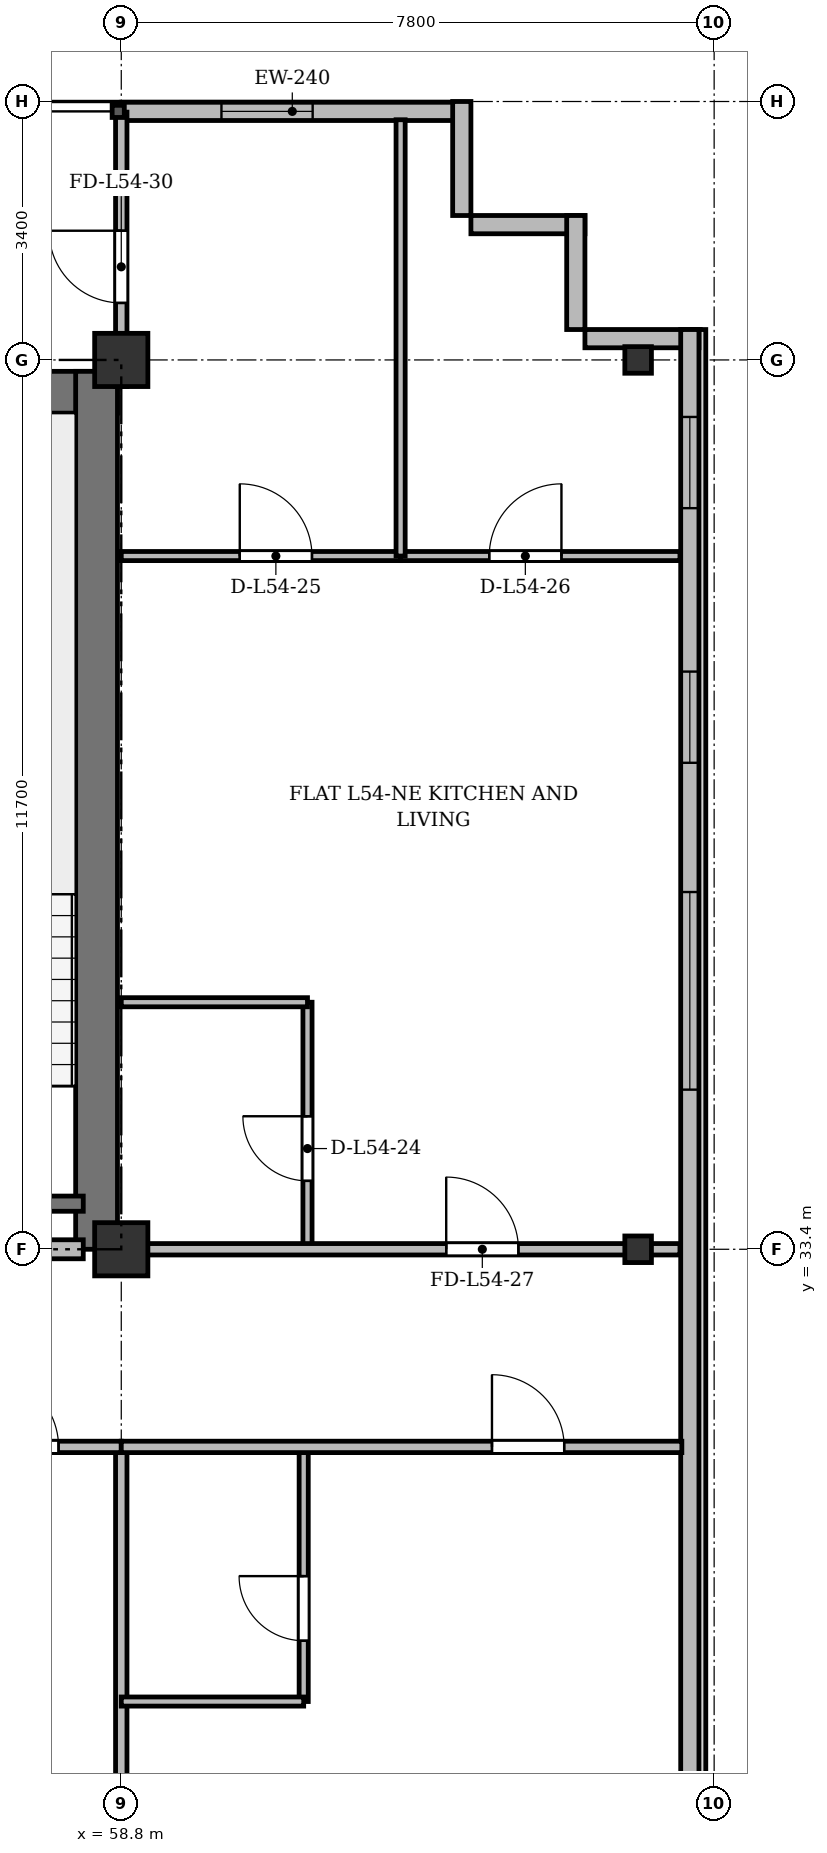
"""IFC4 building model, lengths in metres.
Left out: names, types, materials, properties, quantities, classifications, styles, units other than length and angle.
Written with IfcOpenShell. Run it as: python <this file> out.ifc"""

import sys

from ifc_helpers import new_model, si_unit, direction, frame, frame_2d, origin, origin_2d, place, context, subcontext, project, spatial, rectangle, i_section, extrude, source, transform, mapped, element, fill, save


model = new_model("IFC4")
c1 = context("Model", 3, precision=1e-05, world=origin(), true_north=direction((0.0, 1.0)))
c2 = subcontext(c1, "Body", "Model", "MODEL_VIEW")
j1 = project(units=[si_unit("LENGTHUNIT", "METRE"), si_unit("PLANEANGLEUNIT", "RADIAN")], contexts=[c1])
p1 = place(None, origin())
s1 = spatial("IfcSite", under=j1, at=p1, CompositionType="ELEMENT")
p2 = place(p1, origin())
s2 = spatial("IfcBuilding", under=s1, at=p2, CompositionType="ELEMENT")
p3 = place(p2, frame((0.0, 0.0, 208.5)))
s3 = spatial("IfcBuildingStorey", under=s2, at=p3, CompositionType="ELEMENT", Elevation=208.5)
m1 = source(origin(), c2, "Body", "SweptSolid", [
    extrude(rectangle(XDim=0.7, YDim=0.7, at=origin_2d()), origin(), (0.0, 0.0, 1.0), 3.6),
])
for number, where, z_axis, x_axis in (
    (1, (58.8, 33.4, 0.0), (0.0, 0.0, 1.0), (1.0, 0.0, 0.0)),
    (2, (58.8, 45.1, 0.0), (0.0, 0.0, 1.0), (1.0, 0.0, 0.0)),
):
    element("IfcColumn", number, at=place(p3, frame(where, z_axis=z_axis, x_axis=x_axis)), inside=s3, PredefinedType="COLUMN", context=c2, shape_type="MappedRepresentation", body=[
        mapped(m1, transform((0.0, 0.0, 0.0), x_axis=(1.0, 0.0, 0.0), y_axis=(0.0, 1.0, 0.0), z_axis=(0.0, 0.0, 1.0), scale=1.0)),
    ])
m2 = source(origin(), c2, "Body", "SweptSolid", [
    extrude(i_section(OverallWidth=0.35, OverallDepth=0.35, WebThickness=0.018, FlangeThickness=0.028, at=origin_2d()), origin(), (0.0, 0.0, 1.0), 3.6),
])
for number, where, z_axis, x_axis in (
    (3, (65.6, 33.4, 0.0), (0.0, 0.0, 1.0), (1.0, 0.0, 0.0)),
    (4, (65.6, 45.1, 0.0), (0.0, 0.0, 1.0), (1.0, 0.0, 0.0)),
):
    element("IfcColumn", number, at=place(p3, frame(where, z_axis=z_axis, x_axis=x_axis)), inside=s3, PredefinedType="COLUMN", context=c2, shape_type="MappedRepresentation", body=[
        mapped(m2, transform((0.0, 0.0, 0.0), x_axis=(1.0, 0.0, 0.0), y_axis=(0.0, 1.0, 0.0), z_axis=(0.0, 0.0, 1.0), scale=1.0)),
    ])
p4 = place(p3, frame((58.8, 48.37, 0.0), z_axis=(0.0, 0.0, 1.0), x_axis=(1.0, 0.0, 0.0)))
e5 = element("IfcWall", 5, at=p4, inside=s3, PredefinedType="SOLIDWALL", context=c2, shape_type="SweptSolid", body=[
    extrude(rectangle(XDim=4.5, YDim=0.24, at=frame_2d((2.25, 0.0))), origin(), (0.0, 0.0, 1.0), 3.36),
])
p5 = place(p4, frame((1.318, 0.0, 0.9)))
e6 = element("IfcOpeningElement", 6, at=p5, cuts=e5, PredefinedType="OPENING", context=c2, shape_type="SweptSolid", body=[
    extrude(rectangle(XDim=1.2, YDim=1.65, at=frame_2d((0.6, 0.825))), frame((0.0, 0.13, 0.0), z_axis=(0.0, -1.0, 0.0), x_axis=(1.0, 0.0, 0.0)), (0.0, 0.0, 1.0), 0.26),
])
for number, where, z_axis, x_axis in (
    (7, (63.28, 48.5, 0.0), (0.0, 0.0, 1.0), (0.0, -1.0, 0.0)),
    (8, (63.4, 46.88, 0.0), (0.0, 0.0, 1.0), (1.0, 0.0, 0.0)),
    (9, (64.78, 47.0, 0.0), (0.0, 0.0, 1.0), (0.0, -1.0, 0.0)),
    (10, (64.9, 45.38, 0.0), (0.0, 0.0, 1.0), (1.0, 0.0, 0.0)),
):
    element("IfcWall", number, at=place(p3, frame(where, z_axis=z_axis, x_axis=x_axis)), inside=s3, PredefinedType="SOLIDWALL", context=c2, shape_type="SweptSolid", body=[
        extrude(rectangle(XDim=1.5, YDim=0.24, at=frame_2d((0.75, 0.0))), origin(), (0.0, 0.0, 1.0), 3.36),
    ])
p6 = place(p3, frame((66.28, 45.5, 0.0), z_axis=(0.0, 0.0, 1.0), x_axis=(0.0, -1.0, 0.0)))
e11 = element("IfcWall", 11, at=p6, inside=s3, PredefinedType="SOLIDWALL", context=c2, shape_type="SweptSolid", body=[
    extrude(rectangle(XDim=39.1, YDim=0.24, at=frame_2d((19.55, 0.0))), origin(), (0.0, 0.0, 1.0), 3.36),
])
p7 = place(p6, frame((36.45, 0.0, 0.92)))
e12 = element("IfcOpeningElement", 12, at=p7, cuts=e11, PredefinedType="OPENING", context=c2, shape_type="SweptSolid", body=[
    extrude(rectangle(XDim=1.2, YDim=1.65, at=frame_2d((0.6, 0.825))), frame((0.0, 0.13, 0.0), z_axis=(0.0, -1.0, 0.0), x_axis=(1.0, 0.0, 0.0)), (0.0, 0.0, 1.0), 0.26),
])
p8 = place(p6, frame((32.8, 0.0, 0.92)))
e13 = element("IfcOpeningElement", 13, at=p8, cuts=e11, PredefinedType="OPENING", context=c2, shape_type="SweptSolid", body=[
    extrude(rectangle(XDim=2.6, YDim=1.9, at=frame_2d((1.3, 0.95))), frame((0.0, 0.13, 0.0), z_axis=(0.0, -1.0, 0.0), x_axis=(1.0, 0.0, 0.0)), (0.0, 0.0, 1.0), 0.26),
])
p9 = place(p6, frame((28.6, 0.0, 0.92)))
e14 = element("IfcOpeningElement", 14, at=p9, cuts=e11, PredefinedType="OPENING", context=c2, shape_type="SweptSolid", body=[
    extrude(rectangle(XDim=2.6, YDim=1.9, at=frame_2d((1.3, 0.95))), frame((0.0, 0.13, 0.0), z_axis=(0.0, -1.0, 0.0), x_axis=(1.0, 0.0, 0.0)), (0.0, 0.0, 1.0), 0.26),
])
p10 = place(p6, frame((21.4, 0.0, 0.92)))
e15 = element("IfcOpeningElement", 15, at=p10, cuts=e11, PredefinedType="OPENING", context=c2, shape_type="SweptSolid", body=[
    extrude(rectangle(XDim=2.6, YDim=1.9, at=frame_2d((1.3, 0.95))), frame((0.0, 0.13, 0.0), z_axis=(0.0, -1.0, 0.0), x_axis=(1.0, 0.0, 0.0)), (0.0, 0.0, 1.0), 0.26),
])
p11 = place(p6, frame((7.4, 0.0, 0.92)))
e16 = element("IfcOpeningElement", 16, at=p11, cuts=e11, PredefinedType="OPENING", context=c2, shape_type="SweptSolid", body=[
    extrude(rectangle(XDim=2.6, YDim=1.9, at=frame_2d((1.3, 0.95))), frame((0.0, 0.13, 0.0), z_axis=(0.0, -1.0, 0.0), x_axis=(1.0, 0.0, 0.0)), (0.0, 0.0, 1.0), 0.26),
])
p12 = place(p6, frame((4.5, 0.0, 0.92)))
e17 = element("IfcOpeningElement", 17, at=p12, cuts=e11, PredefinedType="OPENING", context=c2, shape_type="SweptSolid", body=[
    extrude(rectangle(XDim=1.2, YDim=1.65, at=frame_2d((0.6, 0.825))), frame((0.0, 0.13, 0.0), z_axis=(0.0, -1.0, 0.0), x_axis=(1.0, 0.0, 0.0)), (0.0, 0.0, 1.0), 0.26),
])
p13 = place(p6, frame((1.15, 0.0, 0.92)))
e18 = element("IfcOpeningElement", 18, at=p13, cuts=e11, PredefinedType="OPENING", context=c2, shape_type="SweptSolid", body=[
    extrude(rectangle(XDim=1.2, YDim=1.65, at=frame_2d((0.6, 0.825))), frame((0.0, 0.13, 0.0), z_axis=(0.0, -1.0, 0.0), x_axis=(1.0, 0.0, 0.0)), (0.0, 0.0, 1.0), 0.26),
])
p14 = place(p3, frame((15.65, 44.675, 0.0), z_axis=(0.0, 0.0, 1.0), x_axis=(1.0, 0.0, 0.0)))
e19 = element("IfcWall", 19, at=p14, inside=s3, PredefinedType="SHEAR", context=c2, shape_type="SweptSolid", body=[
    extrude(rectangle(XDim=43.1, YDim=0.55, at=frame_2d((21.55, 0.0))), origin(), (0.0, 0.0, 1.0), 3.36),
])
p15 = place(p3, frame((58.475, 33.4, 0.0), z_axis=(0.0, 0.0, 1.0), x_axis=(0.0, 1.0, 0.0)))
e20 = element("IfcWall", 20, at=p15, inside=s3, PredefinedType="SHEAR", context=c2, shape_type="SweptSolid", body=[
    extrude(rectangle(XDim=11.55, YDim=0.55, at=frame_2d((5.775, 0.0))), origin(), (0.0, 0.0, 1.0), 3.36),
])
p16 = place(p3, frame((54.9, 34.0, 0.0), z_axis=(0.0, 0.0, 1.0), x_axis=(1.0, 0.0, 0.0)))
e21 = element("IfcWall", 21, at=p16, inside=s3, PredefinedType="SHEAR", context=c2, shape_type="SweptSolid", body=[
    extrude(rectangle(XDim=3.4, YDim=0.2, at=frame_2d((1.7, 0.0))), origin(), (0.0, 0.0, 1.0), 3.36),
])
p17 = place(p3, frame((47.15, 33.4, 0.0), z_axis=(0.0, 0.0, 1.0), x_axis=(1.0, 0.0, 0.0)))
e22 = element("IfcWall", 22, at=p17, inside=s3, PredefinedType="PARTITIONING", context=c2, shape_type="SweptSolid", body=[
    extrude(rectangle(XDim=11.15, YDim=0.25, at=frame_2d((5.575, 0.0))), origin(), (0.0, 0.0, 1.0), 2.91),
])
p18 = place(p17, frame((0.7, 0.0, 0.0)))
e23 = element("IfcOpeningElement", 23, at=p18, cuts=e22, PredefinedType="OPENING", context=c2, shape_type="SweptSolid", body=[
    extrude(rectangle(XDim=0.95, YDim=2.15, at=frame_2d((0.475, 1.075))), frame((0.0, 0.135, 0.0), z_axis=(0.0, -1.0, 0.0), x_axis=(1.0, 0.0, 0.0)), (0.0, 0.0, 1.0), 0.27),
])
p19 = place(p17, frame((6.0, 0.0, 0.0)))
e24 = element("IfcOpeningElement", 24, at=p19, cuts=e22, PredefinedType="OPENING", context=c2, shape_type="SweptSolid", body=[
    extrude(rectangle(XDim=1.2, YDim=2.15, at=frame_2d((0.6, 1.075))), frame((0.0, 0.135, 0.0), z_axis=(0.0, -1.0, 0.0), x_axis=(1.0, 0.0, 0.0)), (0.0, 0.0, 1.0), 0.27),
])
p20 = place(p3, frame((61.25, 33.4, 0.0), z_axis=(0.0, 0.0, 1.0), x_axis=(0.0, 1.0, 0.0)))
e25 = element("IfcWall", 25, at=p20, inside=s3, PredefinedType="PARTITIONING", context=c2, shape_type="SweptSolid", body=[
    extrude(rectangle(XDim=3.25, YDim=0.12, at=frame_2d((1.625, 0.0))), origin(), (0.0, 0.0, 1.0), 2.91),
])
p21 = place(p20, frame((0.9, 0.0, 0.0)))
e26 = element("IfcOpeningElement", 26, at=p21, cuts=e25, PredefinedType="OPENING", context=c2, shape_type="SweptSolid", body=[
    extrude(rectangle(XDim=0.85, YDim=2.1, at=frame_2d((0.425, 1.05))), frame((0.0, 0.07, 0.0), z_axis=(0.0, -1.0, 0.0), x_axis=(1.0, 0.0, 0.0)), (0.0, 0.0, 1.0), 0.14),
])
p22 = place(p3, frame((58.8, 36.65, 0.0), z_axis=(0.0, 0.0, 1.0), x_axis=(1.0, 0.0, 0.0)))
e27 = element("IfcWall", 27, at=p22, inside=s3, PredefinedType="PARTITIONING", context=c2, shape_type="SweptSolid", body=[
    extrude(rectangle(XDim=2.45, YDim=0.12, at=frame_2d((1.225, 0.0))), origin(), (0.0, 0.0, 1.0), 2.86),
])
p23 = place(p3, frame((58.8, 42.52, 0.0), z_axis=(0.0, 0.0, 1.0), x_axis=(1.0, 0.0, 0.0)))
e28 = element("IfcWall", 28, at=p23, inside=s3, PredefinedType="PARTITIONING", context=c2, shape_type="SweptSolid", body=[
    extrude(rectangle(XDim=3.675, YDim=0.12, at=frame_2d((1.837, 0.0))), origin(), (0.0, 0.0, 1.0), 2.86),
])
p24 = place(p23, frame((1.559, 0.0, 0.0)))
e29 = element("IfcOpeningElement", 29, at=p24, cuts=e28, PredefinedType="OPENING", context=c2, shape_type="SweptSolid", body=[
    extrude(rectangle(XDim=0.95, YDim=2.15, at=frame_2d((0.475, 1.075))), frame((0.0, 0.07, 0.0), z_axis=(0.0, -1.0, 0.0), x_axis=(1.0, 0.0, 0.0)), (0.0, 0.0, 1.0), 0.14),
])
p25 = place(p3, frame((62.475, 42.52, 0.0), z_axis=(0.0, 0.0, 1.0), x_axis=(1.0, 0.0, 0.0)))
e30 = element("IfcWall", 30, at=p25, inside=s3, PredefinedType="PARTITIONING", context=c2, shape_type="SweptSolid", body=[
    extrude(rectangle(XDim=3.675, YDim=0.12, at=frame_2d((1.837, 0.0))), origin(), (0.0, 0.0, 1.0), 2.86),
])
p26 = place(p25, frame((1.166, 0.0, 0.0)))
e31 = element("IfcOpeningElement", 31, at=p26, cuts=e30, PredefinedType="OPENING", context=c2, shape_type="SweptSolid", body=[
    extrude(rectangle(XDim=0.95, YDim=2.15, at=frame_2d((0.475, 1.075))), frame((0.0, 0.07, 0.0), z_axis=(0.0, -1.0, 0.0), x_axis=(1.0, 0.0, 0.0)), (0.0, 0.0, 1.0), 0.14),
])
p27 = place(p3, frame((62.475, 42.52, 0.0), z_axis=(0.0, 0.0, 1.0), x_axis=(0.0, 1.0, 0.0)))
e32 = element("IfcWall", 32, at=p27, inside=s3, PredefinedType="PARTITIONING", context=c2, shape_type="SweptSolid", body=[
    extrude(rectangle(XDim=5.74, YDim=0.12, at=frame_2d((2.87, 0.0))), origin(), (0.0, 0.0, 1.0), 2.91),
])
p28 = place(p3, frame((58.8, 33.4, 0.0), z_axis=(0.0, 0.0, 1.0), x_axis=(1.0, 0.0, 0.0)))
e33 = element("IfcWall", 33, at=p28, inside=s3, PredefinedType="PARTITIONING", context=c2, shape_type="SweptSolid", body=[
    extrude(rectangle(XDim=7.35, YDim=0.15, at=frame_2d((3.675, 0.0))), origin(), (0.0, 0.0, 1.0), 2.91),
])
p29 = place(p28, frame((4.275, 0.0, 0.0)))
e34 = element("IfcOpeningElement", 34, at=p29, cuts=e33, PredefinedType="OPENING", context=c2, shape_type="SweptSolid", body=[
    extrude(rectangle(XDim=0.95, YDim=2.15, at=frame_2d((0.475, 1.075))), frame((0.0, 0.085, 0.0), z_axis=(0.0, -1.0, 0.0), x_axis=(1.0, 0.0, 0.0)), (0.0, 0.0, 1.0), 0.17),
])
p30 = place(p3, frame((58.8, 44.75, 0.0), z_axis=(0.0, 0.0, 1.0), x_axis=(0.0, 1.0, 0.0)))
e35 = element("IfcWall", 35, at=p30, inside=s3, PredefinedType="PARTITIONING", context=c2, shape_type="SweptSolid", body=[
    extrude(rectangle(XDim=3.61, YDim=0.15, at=frame_2d((1.805, 0.0))), origin(), (0.0, 0.0, 1.0), 2.86),
])
p31 = place(p30, frame((1.1, 0.0, 0.0)))
e36 = element("IfcOpeningElement", 36, at=p31, cuts=e35, PredefinedType="OPENING", context=c2, shape_type="SweptSolid", body=[
    extrude(rectangle(XDim=0.95, YDim=2.15, at=frame_2d((0.475, 1.075))), frame((0.0, 0.085, 0.0), z_axis=(0.0, -1.0, 0.0), x_axis=(1.0, 0.0, 0.0)), (0.0, 0.0, 1.0), 0.17),
])
p32 = place(p3, frame((58.8, 3.625, 0.0), z_axis=(0.0, 0.0, 1.0), x_axis=(0.0, 1.0, 0.0)))
e37 = element("IfcWall", 37, at=p32, inside=s3, PredefinedType="PARTITIONING", context=c2, shape_type="SweptSolid", body=[
    extrude(rectangle(XDim=27.175, YDim=0.15, at=frame_2d((13.587, 0.0))), origin(), (0.0, 0.0, 1.0), 2.86),
])
p33 = place(p3, frame((56.2, 30.8, 0.0), z_axis=(0.0, 0.0, 1.0), x_axis=(1.0, 0.0, 0.0)))
e38 = element("IfcWall", 38, at=p33, inside=s3, PredefinedType="PARTITIONING", context=c2, shape_type="SweptSolid", body=[
    extrude(rectangle(XDim=2.6, YDim=0.15, at=frame_2d((1.3, 0.0))), origin(), (0.0, 0.0, 1.0), 2.86),
])
p34 = place(p33, frame((0.825, 0.0, 0.0)))
e39 = element("IfcOpeningElement", 39, at=p34, cuts=e38, PredefinedType="OPENING", context=c2, shape_type="SweptSolid", body=[
    extrude(rectangle(XDim=0.95, YDim=2.15, at=frame_2d((0.475, 1.075))), frame((0.0, 0.085, 0.0), z_axis=(0.0, -1.0, 0.0), x_axis=(1.0, 0.0, 0.0)), (0.0, 0.0, 1.0), 0.17),
])
p35 = place(p3, frame((61.2, 27.45, 0.0), z_axis=(0.0, 0.0, 1.0), x_axis=(0.0, 1.0, 0.0)))
e40 = element("IfcWall", 40, at=p35, inside=s3, PredefinedType="PARTITIONING", context=c2, shape_type="SweptSolid", body=[
    extrude(rectangle(XDim=3.35, YDim=0.12, at=frame_2d((1.675, 0.0))), origin(), (0.0, 0.0, 1.0), 3.36),
])
p36 = place(p35, frame((0.8, 0.0, 0.0)))
e41 = element("IfcOpeningElement", 41, at=p36, cuts=e40, PredefinedType="OPENING", context=c2, shape_type="SweptSolid", body=[
    extrude(rectangle(XDim=0.85, YDim=2.1, at=frame_2d((0.425, 1.05))), frame((0.0, 0.07, 0.0), z_axis=(0.0, -1.0, 0.0), x_axis=(1.0, 0.0, 0.0)), (0.0, 0.0, 1.0), 0.14),
])
p37 = place(p3, frame((58.8, 27.45, 0.0), z_axis=(0.0, 0.0, 1.0), x_axis=(1.0, 0.0, 0.0)))
e42 = element("IfcWall", 42, at=p37, inside=s3, PredefinedType="PARTITIONING", context=c2, shape_type="SweptSolid", body=[
    extrude(rectangle(XDim=2.4, YDim=0.12, at=frame_2d((1.2, 0.0))), origin(), (0.0, 0.0, 1.0), 2.86),
])
p38 = place(p3, frame((58.8, 30.8, 0.0), z_axis=(0.0, 0.0, 1.0), x_axis=(1.0, 0.0, 0.0)))
e43 = element("IfcWall", 43, at=p38, inside=s3, PredefinedType="PARTITIONING", context=c2, shape_type="SweptSolid", body=[
    extrude(rectangle(XDim=7.375, YDim=0.15, at=frame_2d((3.688, 0.0))), origin(), (0.0, 0.0, 1.0), 2.86),
])
p39 = place(p38, frame((4.877, 0.0, 0.0)))
e44 = element("IfcOpeningElement", 44, at=p39, cuts=e43, PredefinedType="OPENING", context=c2, shape_type="SweptSolid", body=[
    extrude(rectangle(XDim=0.95, YDim=2.15, at=frame_2d((0.475, 1.075))), frame((0.0, 0.085, 0.0), z_axis=(0.0, -1.0, 0.0), x_axis=(1.0, 0.0, 0.0)), (0.0, 0.0, 1.0), 0.17),
])
m3 = source(origin(), c2, "Body", "SweptSolid", [
    extrude(rectangle(XDim=1.2, YDim=1.65, at=frame_2d((0.6, 0.825))), frame((0.0, 0.03, 0.0), z_axis=(0.0, -1.0, 0.0), x_axis=(1.0, 0.0, 0.0)), (0.0, 0.0, 1.0), 0.06),
])
p40 = place(p5, origin())
e45 = element("IfcWindow", 45, at=p40, inside=s3, PartitioningType="SINGLE_PANEL", PredefinedType="WINDOW", context=c2, shape_type="MappedRepresentation", body=[
    mapped(m3, transform((0.0, 0.0, 0.0), x_axis=(1.0, 0.0, 0.0), y_axis=(0.0, 1.0, 0.0), z_axis=(0.0, 0.0, 1.0), scale=1.0)),
])
fill(e6, e45)
m4 = source(origin(), c2, "Body", "SweptSolid", [
    extrude(rectangle(XDim=2.6, YDim=1.9, at=frame_2d((1.3, 0.95))), frame((0.0, 0.03, 0.0), z_axis=(0.0, -1.0, 0.0), x_axis=(1.0, 0.0, 0.0)), (0.0, 0.0, 1.0), 0.06),
])
p41 = place(p11, origin())
e46 = element("IfcWindow", 46, at=p41, inside=s3, PartitioningType="SINGLE_PANEL", PredefinedType="WINDOW", context=c2, shape_type="MappedRepresentation", body=[
    mapped(m4, transform((0.0, 0.0, 0.0), x_axis=(1.0, 0.0, 0.0), y_axis=(0.0, 1.0, 0.0), z_axis=(0.0, 0.0, 1.0), scale=1.0)),
])
fill(e16, e46)
p42 = place(p12, origin())
e47 = element("IfcWindow", 47, at=p42, inside=s3, PartitioningType="SINGLE_PANEL", PredefinedType="WINDOW", context=c2, shape_type="MappedRepresentation", body=[
    mapped(m3, transform((0.0, 0.0, 0.0), x_axis=(1.0, 0.0, 0.0), y_axis=(0.0, 1.0, 0.0), z_axis=(0.0, 0.0, 1.0), scale=1.0)),
])
fill(e17, e47)
p43 = place(p13, origin())
e48 = element("IfcWindow", 48, at=p43, inside=s3, PartitioningType="SINGLE_PANEL", PredefinedType="WINDOW", context=c2, shape_type="MappedRepresentation", body=[
    mapped(m3, transform((0.0, 0.0, 0.0), x_axis=(1.0, 0.0, 0.0), y_axis=(0.0, 1.0, 0.0), z_axis=(0.0, 0.0, 1.0), scale=1.0)),
])
fill(e18, e48)
m5 = source(origin(), c2, "Body", "SweptSolid", [
    extrude(rectangle(XDim=0.85, YDim=2.1, at=frame_2d((0.425, 1.05))), frame((0.0, 0.025, 0.0), z_axis=(0.0, -1.0, 0.0), x_axis=(1.0, 0.0, 0.0)), (0.0, 0.0, 1.0), 0.05),
])
p44 = place(p21, origin())
e49 = element("IfcDoor", 49, at=p44, inside=s3, OperationType="SINGLE_SWING_RIGHT", PredefinedType="DOOR", context=c2, shape_type="MappedRepresentation", body=[
    mapped(m5, transform((0.0, 0.0, 0.0), x_axis=(1.0, 0.0, 0.0), y_axis=(0.0, 1.0, 0.0), z_axis=(0.0, 0.0, 1.0), scale=1.0)),
])
fill(e26, e49)
m6 = source(origin(), c2, "Body", "SweptSolid", [
    extrude(rectangle(XDim=0.95, YDim=2.15, at=frame_2d((0.475, 1.075))), frame((0.0, 0.025, 0.0), z_axis=(0.0, -1.0, 0.0), x_axis=(1.0, 0.0, 0.0)), (0.0, 0.0, 1.0), 0.05),
])
p45 = place(p24, origin())
e50 = element("IfcDoor", 50, at=p45, inside=s3, OperationType="SINGLE_SWING_LEFT", PredefinedType="DOOR", context=c2, shape_type="MappedRepresentation", body=[
    mapped(m6, transform((0.0, 0.0, 0.0), x_axis=(1.0, 0.0, 0.0), y_axis=(0.0, 1.0, 0.0), z_axis=(0.0, 0.0, 1.0), scale=1.0)),
])
fill(e29, e50)
p46 = place(p26, origin())
e51 = element("IfcDoor", 51, at=p46, inside=s3, OperationType="SINGLE_SWING_RIGHT", PredefinedType="DOOR", context=c2, shape_type="MappedRepresentation", body=[
    mapped(m6, transform((0.0, 0.0, 0.0), x_axis=(1.0, 0.0, 0.0), y_axis=(0.0, 1.0, 0.0), z_axis=(0.0, 0.0, 1.0), scale=1.0)),
])
fill(e31, e51)
p47 = place(p29, origin())
e52 = element("IfcDoor", 52, at=p47, inside=s3, OperationType="SINGLE_SWING_LEFT", PredefinedType="DOOR", context=c2, shape_type="MappedRepresentation", body=[
    mapped(m6, transform((0.0, 0.0, 0.0), x_axis=(1.0, 0.0, 0.0), y_axis=(0.0, 1.0, 0.0), z_axis=(0.0, 0.0, 1.0), scale=1.0)),
])
fill(e34, e52)
p48 = place(p31, origin())
e53 = element("IfcDoor", 53, at=p48, inside=s3, OperationType="SINGLE_SWING_RIGHT", PredefinedType="DOOR", context=c2, shape_type="MappedRepresentation", body=[
    mapped(m6, transform((0.0, 0.0, 0.0), x_axis=(1.0, 0.0, 0.0), y_axis=(0.0, 1.0, 0.0), z_axis=(0.0, 0.0, 1.0), scale=1.0)),
])
fill(e36, e53)
p49 = place(p34, origin())
e54 = element("IfcDoor", 54, at=p49, inside=s3, OperationType="SINGLE_SWING_LEFT", PredefinedType="DOOR", context=c2, shape_type="MappedRepresentation", body=[
    mapped(m6, transform((0.0, 0.0, 0.0), x_axis=(1.0, 0.0, 0.0), y_axis=(0.0, 1.0, 0.0), z_axis=(0.0, 0.0, 1.0), scale=1.0)),
])
fill(e39, e54)
p50 = place(p36, origin())
e55 = element("IfcDoor", 55, at=p50, inside=s3, OperationType="SINGLE_SWING_RIGHT", PredefinedType="DOOR", context=c2, shape_type="MappedRepresentation", body=[
    mapped(m5, transform((0.0, 0.0, 0.0), x_axis=(1.0, 0.0, 0.0), y_axis=(0.0, 1.0, 0.0), z_axis=(0.0, 0.0, 1.0), scale=1.0)),
])
fill(e41, e55)
p51 = place(p39, origin())
e56 = element("IfcDoor", 56, at=p51, inside=s3, OperationType="SINGLE_SWING_LEFT", PredefinedType="DOOR", context=c2, shape_type="MappedRepresentation", body=[
    mapped(m6, transform((0.0, 0.0, 0.0), x_axis=(1.0, 0.0, 0.0), y_axis=(0.0, 1.0, 0.0), z_axis=(0.0, 0.0, 1.0), scale=1.0)),
])
fill(e44, e56)
save(model, sys.argv[1])
